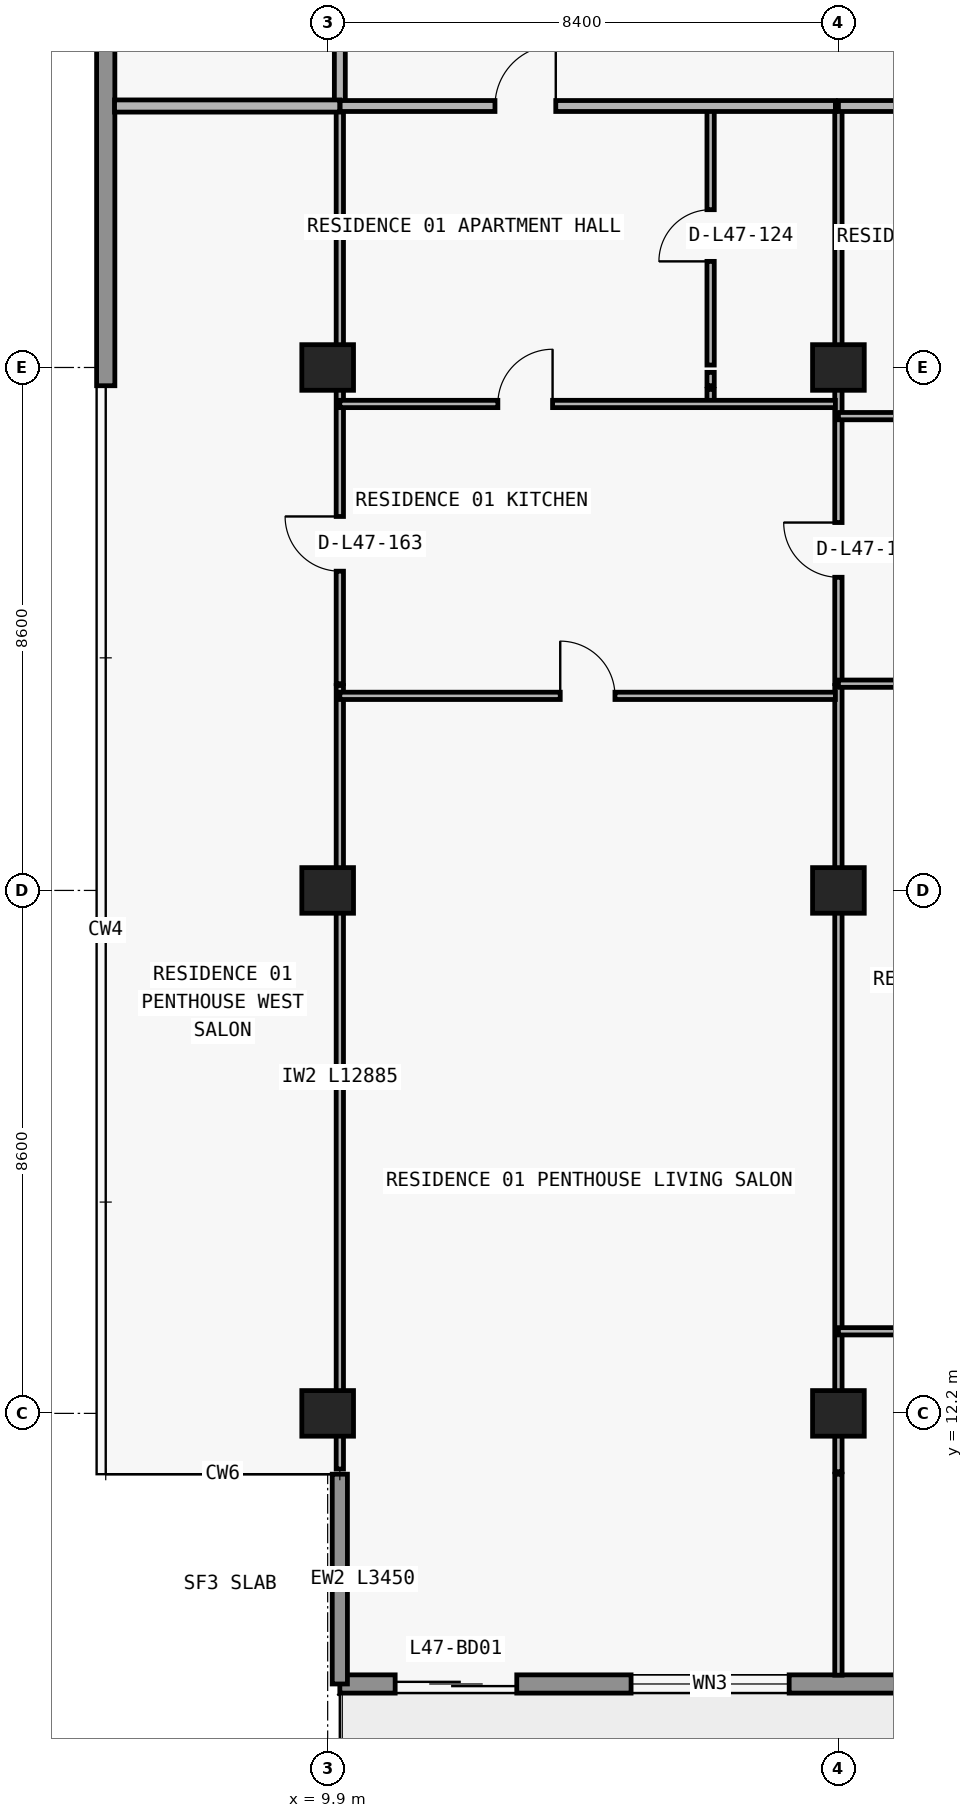
"""IFC4 building model, lengths in metres.
Left out: names, types, materials, properties, quantities, classifications, styles, units other than length and angle.
Written with IfcOpenShell. Run it as: python <this file> out.ifc"""

import sys

from ifc_helpers import new_model, si_unit, direction, frame, frame_2d, origin, origin_2d, place, context, subcontext, project, spatial, rectangle, extrude, element, fill, save


model = new_model("IFC4")
c1 = context("Model", 3, precision=1e-05, world=origin(), true_north=direction((0.0, 1.0)))
c2 = subcontext(c1, "Body", "Model", "MODEL_VIEW")
j1 = project(units=[si_unit("LENGTHUNIT", "METRE"), si_unit("PLANEANGLEUNIT", "RADIAN")], contexts=[c1])
p1 = place(None, origin())
s1 = spatial("IfcSite", under=j1, at=p1, CompositionType="ELEMENT")
p2 = place(p1, origin())
s2 = spatial("IfcBuilding", under=s1, at=p2, CompositionType="ELEMENT")
p3 = place(p2, frame((0.0, 0.0, 170.4)))
s3 = spatial("IfcBuildingStorey", under=s2, at=p3, CompositionType="ELEMENT", Elevation=170.4)
for number, where, z_axis, x_axis in (
    (1, (9.9, 12.2, 0.0), (0.0, 0.0, 1.0), (1.0, 0.0, 0.0)),
    (2, (18.3, 12.2, 0.0), (0.0, 0.0, 1.0), (1.0, 0.0, 0.0)),
    (3, (9.9, 20.8, 0.0), (0.0, 0.0, 1.0), (1.0, 0.0, 0.0)),
    (4, (18.3, 20.8, 0.0), (0.0, 0.0, 1.0), (1.0, 0.0, 0.0)),
    (5, (9.9, 29.4, 0.0), (0.0, 0.0, 1.0), (1.0, 0.0, 0.0)),
    (6, (18.3, 29.4, 0.0), (0.0, 0.0, 1.0), (1.0, 0.0, 0.0)),
):
    element("IfcColumn", number, at=place(p3, frame(where, z_axis=z_axis, x_axis=x_axis)), inside=s3, PredefinedType="COLUMN", context=c2, shape_type="SweptSolid", body=[
        extrude(rectangle(XDim=0.85, YDim=0.75, at=origin_2d()), origin(), (0.0, 0.0, 1.0), 3.05),
    ])
p4 = place(p3, frame((67.7, 7.75, 0.0), z_axis=(0.0, 0.0, 1.0), x_axis=(-1.0, 0.0, 0.0)))
e7 = element("IfcWall", 7, at=p4, inside=s3, PredefinedType="STANDARD", context=c2, shape_type="SweptSolid", body=[
    extrude(rectangle(XDim=57.6, YDim=0.3, at=frame_2d((28.8, 0.0))), origin(), (0.0, 0.0, 1.0), 3.05),
])
p5 = place(p4, frame((54.69, 0.0, 0.0)))
e8 = element("IfcOpeningElement", 8, at=p5, cuts=e7, PredefinedType="OPENING", context=c2, shape_type="SweptSolid", body=[
    extrude(rectangle(XDim=2.0, YDim=2.3, at=frame_2d((1.0, 1.15))), frame((0.0, 0.16, 0.0), z_axis=(0.0, -1.0, 0.0), x_axis=(1.0, 0.0, 0.0)), (0.0, 0.0, 1.0), 0.32),
])
p6 = place(p4, frame((50.21, 0.0, 0.65)))
e9 = element("IfcOpeningElement", 9, at=p6, cuts=e7, PredefinedType="OPENING", context=c2, shape_type="SweptSolid", body=[
    extrude(rectangle(XDim=2.6, YDim=1.85, at=frame_2d((1.3, 0.925))), frame((0.0, 0.16, 0.0), z_axis=(0.0, -1.0, 0.0), x_axis=(1.0, 0.0, 0.0)), (0.0, 0.0, 1.0), 0.32),
])
p7 = place(p4, frame((44.1, 0.0, 0.85)))
e10 = element("IfcOpeningElement", 10, at=p7, cuts=e7, PredefinedType="OPENING", context=c2, shape_type="SweptSolid", body=[
    extrude(rectangle(XDim=2.2, YDim=1.55, at=frame_2d((1.1, 0.775))), frame((0.0, 0.16, 0.0), z_axis=(0.0, -1.0, 0.0), x_axis=(1.0, 0.0, 0.0)), (0.0, 0.0, 1.0), 0.32),
])
p8 = place(p4, frame((37.69, 0.0, 0.0)))
e11 = element("IfcOpeningElement", 11, at=p8, cuts=e7, PredefinedType="OPENING", context=c2, shape_type="SweptSolid", body=[
    extrude(rectangle(XDim=2.0, YDim=2.3, at=frame_2d((1.0, 1.15))), frame((0.0, 0.16, 0.0), z_axis=(0.0, -1.0, 0.0), x_axis=(1.0, 0.0, 0.0)), (0.0, 0.0, 1.0), 0.32),
])
p9 = place(p4, frame((33.59, 0.0, 0.85)))
e12 = element("IfcOpeningElement", 12, at=p9, cuts=e7, PredefinedType="OPENING", context=c2, shape_type="SweptSolid", body=[
    extrude(rectangle(XDim=1.8, YDim=1.55, at=frame_2d((0.9, 0.775))), frame((0.0, 0.16, 0.0), z_axis=(0.0, -1.0, 0.0), x_axis=(1.0, 0.0, 0.0)), (0.0, 0.0, 1.0), 0.32),
])
p10 = place(p4, frame((25.914, 0.0, 0.85)))
e13 = element("IfcOpeningElement", 13, at=p10, cuts=e7, PredefinedType="OPENING", context=c2, shape_type="SweptSolid", body=[
    extrude(rectangle(XDim=2.2, YDim=1.55, at=frame_2d((1.1, 0.775))), frame((0.0, 0.16, 0.0), z_axis=(0.0, -1.0, 0.0), x_axis=(1.0, 0.0, 0.0)), (0.0, 0.0, 1.0), 0.32),
])
p11 = place(p4, frame((21.69, 0.0, 0.0)))
e14 = element("IfcOpeningElement", 14, at=p11, cuts=e7, PredefinedType="OPENING", context=c2, shape_type="SweptSolid", body=[
    extrude(rectangle(XDim=2.0, YDim=2.3, at=frame_2d((1.0, 1.15))), frame((0.0, 0.16, 0.0), z_axis=(0.0, -1.0, 0.0), x_axis=(1.0, 0.0, 0.0)), (0.0, 0.0, 1.0), 0.32),
])
p12 = place(p4, frame((17.59, 0.0, 0.85)))
e15 = element("IfcOpeningElement", 15, at=p12, cuts=e7, PredefinedType="OPENING", context=c2, shape_type="SweptSolid", body=[
    extrude(rectangle(XDim=1.8, YDim=1.55, at=frame_2d((0.9, 0.775))), frame((0.0, 0.16, 0.0), z_axis=(0.0, -1.0, 0.0), x_axis=(1.0, 0.0, 0.0)), (0.0, 0.0, 1.0), 0.32),
])
p13 = place(p4, frame((13.69, 0.0, 0.0)))
e16 = element("IfcOpeningElement", 16, at=p13, cuts=e7, PredefinedType="OPENING", context=c2, shape_type="SweptSolid", body=[
    extrude(rectangle(XDim=2.0, YDim=2.3, at=frame_2d((1.0, 1.15))), frame((0.0, 0.16, 0.0), z_axis=(0.0, -1.0, 0.0), x_axis=(1.0, 0.0, 0.0)), (0.0, 0.0, 1.0), 0.32),
])
p14 = place(p4, frame((9.01, 0.0, 0.65)))
e17 = element("IfcOpeningElement", 17, at=p14, cuts=e7, PredefinedType="OPENING", context=c2, shape_type="SweptSolid", body=[
    extrude(rectangle(XDim=2.6, YDim=1.85, at=frame_2d((1.3, 0.925))), frame((0.0, 0.16, 0.0), z_axis=(0.0, -1.0, 0.0), x_axis=(1.0, 0.0, 0.0)), (0.0, 0.0, 1.0), 0.32),
])
p15 = place(p4, frame((3.0, 0.0, 0.85)))
e18 = element("IfcOpeningElement", 18, at=p15, cuts=e7, PredefinedType="OPENING", context=c2, shape_type="SweptSolid", body=[
    extrude(rectangle(XDim=2.2, YDim=1.55, at=frame_2d((1.1, 0.775))), frame((0.0, 0.16, 0.0), z_axis=(0.0, -1.0, 0.0), x_axis=(1.0, 0.0, 0.0)), (0.0, 0.0, 1.0), 0.32),
])
p16 = place(p3, frame((10.1, 11.2, 0.0), z_axis=(0.0, 0.0, 1.0), x_axis=(0.0, -1.0, 0.0)))
e19 = element("IfcWall", 19, at=p16, inside=s3, PredefinedType="ELEMENTEDWALL", context=c2, shape_type="SweptSolid", body=[
    extrude(rectangle(XDim=3.45, YDim=0.25, at=frame_2d((1.725, 0.0))), origin(), (0.0, 0.0, 1.0), 3.05),
])
p17 = place(p3, frame((6.25, 29.1, 0.0), z_axis=(0.0, 0.0, 1.0), x_axis=(0.0, 1.0, 0.0)))
e20 = element("IfcWall", 20, at=p17, inside=s3, PredefinedType="STANDARD", context=c2, shape_type="SweptSolid", body=[
    extrude(rectangle(XDim=17.9, YDim=0.3, at=frame_2d((8.95, 0.0))), origin(), (0.0, 0.0, 1.0), 3.05),
])
p18 = place(p3, frame((10.1, 11.285, 0.0), z_axis=(0.0, 0.0, 1.0), x_axis=(0.0, 1.0, 0.0)))
e21 = element("IfcWall", 21, at=p18, inside=s3, PredefinedType="PARTITIONING", context=c2, shape_type="SweptSolid", body=[
    extrude(rectangle(XDim=12.885, YDim=0.12, at=frame_2d((6.442, 0.0))), origin(), (0.0, 0.0, 1.0), 2.263),
])
p19 = place(p3, frame((10.1, 24.2, 0.0), z_axis=(0.0, 0.0, 1.0), x_axis=(0.0, 1.0, 0.0)))
e22 = element("IfcWall", 22, at=p19, inside=s3, PredefinedType="PARTITIONING", context=c2, shape_type="SweptSolid", body=[
    extrude(rectangle(XDim=4.84, YDim=0.12, at=frame_2d((2.42, 0.0))), origin(), (0.0, 0.0, 1.0), 2.263),
])
p20 = place(p19, frame((1.85, 0.0, 0.0)))
e23 = element("IfcOpeningElement", 23, at=p20, cuts=e22, PredefinedType="OPENING", context=c2, shape_type="SweptSolid", body=[
    extrude(rectangle(XDim=0.9, YDim=2.15, at=frame_2d((0.45, 1.075))), frame((0.0, 0.07, 0.0), z_axis=(0.0, -1.0, 0.0), x_axis=(1.0, 0.0, 0.0)), (0.0, 0.0, 1.0), 0.14),
])
p21 = place(p3, frame((10.1, 29.1, 0.0), z_axis=(0.0, 0.0, 1.0), x_axis=(0.0, 1.0, 0.0)))
e24 = element("IfcWall", 24, at=p21, inside=s3, PredefinedType="PARTITIONING", context=c2, shape_type="SweptSolid", body=[
    extrude(rectangle(XDim=0.22, YDim=0.12, at=frame_2d((0.11, 0.0))), origin(), (0.0, 0.0, 1.0), 3.05),
])
p22 = place(p3, frame((10.1, 29.44, 0.0), z_axis=(0.0, 0.0, 1.0), x_axis=(0.0, 1.0, 0.0)))
e25 = element("IfcWall", 25, at=p22, inside=s3, PredefinedType="PARTITIONING", context=c2, shape_type="SweptSolid", body=[
    extrude(rectangle(XDim=4.26, YDim=0.12, at=frame_2d((2.13, 0.0))), origin(), (0.0, 0.0, 1.0), 2.263),
])
p23 = place(p3, frame((10.1, 33.705, 0.0), z_axis=(0.0, 0.0, 1.0), x_axis=(0.0, 1.0, 0.0)))
e26 = element("IfcWall", 26, at=p23, inside=s3, PredefinedType="PARTITIONING", context=c2, shape_type="SweptSolid", body=[
    extrude(rectangle(XDim=3.245, YDim=0.18, at=frame_2d((1.623, 0.0))), origin(), (0.0, 0.0, 1.0), 2.263),
])
p24 = place(p3, frame((16.198, 28.8, 0.0), z_axis=(0.0, 0.0, 1.0), x_axis=(0.0, 1.0, 0.0)))
e27 = element("IfcWall", 27, at=p24, inside=s3, PredefinedType="PARTITIONING", context=c2, shape_type="SweptSolid", body=[
    extrude(rectangle(XDim=0.24, YDim=0.12, at=frame_2d((0.12, 0.0))), origin(), (0.0, 0.0, 1.0), 3.05),
])
p25 = place(p3, frame((16.198, 29.1, 0.0), z_axis=(0.0, 0.0, 1.0), x_axis=(0.0, 1.0, 0.0)))
e28 = element("IfcWall", 28, at=p25, inside=s3, PredefinedType="PARTITIONING", context=c2, shape_type="SweptSolid", body=[
    extrude(rectangle(XDim=0.22, YDim=0.12, at=frame_2d((0.11, 0.0))), origin(), (0.0, 0.0, 1.0), 3.05),
])
p26 = place(p3, frame((16.198, 29.44, 0.0), z_axis=(0.0, 0.0, 1.0), x_axis=(0.0, 1.0, 0.0)))
e29 = element("IfcWall", 29, at=p26, inside=s3, PredefinedType="PARTITIONING", context=c2, shape_type="SweptSolid", body=[
    extrude(rectangle(XDim=4.26, YDim=0.12, at=frame_2d((2.13, 0.0))), origin(), (0.0, 0.0, 1.0), 3.05),
])
p27 = place(p26, frame((1.705, 0.0, 0.0)))
e30 = element("IfcOpeningElement", 30, at=p27, cuts=e29, PredefinedType="OPENING", context=c2, shape_type="SweptSolid", body=[
    extrude(rectangle(XDim=0.85, YDim=2.1, at=frame_2d((0.425, 1.05))), frame((0.0, 0.07, 0.0), z_axis=(0.0, -1.0, 0.0), x_axis=(1.0, 0.0, 0.0)), (0.0, 0.0, 1.0), 0.14),
])
p28 = place(p3, frame((18.3, 7.895, 0.0), z_axis=(0.0, 0.0, 1.0), x_axis=(0.0, 1.0, 0.0)))
e31 = element("IfcWall", 31, at=p28, inside=s3, PredefinedType="PARTITIONING", context=c2, shape_type="SweptSolid", body=[
    extrude(rectangle(XDim=3.305, YDim=0.12, at=frame_2d((1.652, 0.0))), origin(), (0.0, 0.0, 1.0), 3.05),
])
p29 = place(p3, frame((18.3, 11.24, 0.0), z_axis=(0.0, 0.0, 1.0), x_axis=(0.0, 1.0, 0.0)))
e32 = element("IfcWall", 32, at=p29, inside=s3, PredefinedType="PARTITIONING", context=c2, shape_type="SweptSolid", body=[
    extrude(rectangle(XDim=12.93, YDim=0.12, at=frame_2d((6.465, 0.0))), origin(), (0.0, 0.0, 1.0), 2.263),
])
p30 = place(p3, frame((18.3, 24.2, 0.0), z_axis=(0.0, 0.0, 1.0), x_axis=(0.0, 1.0, 0.0)))
e33 = element("IfcWall", 33, at=p30, inside=s3, PredefinedType="PARTITIONING", context=c2, shape_type="SweptSolid", body=[
    extrude(rectangle(XDim=4.84, YDim=0.12, at=frame_2d((2.42, 0.0))), origin(), (0.0, 0.0, 1.0), 2.263),
])
p31 = place(p30, frame((1.75, 0.0, 0.0)))
e34 = element("IfcOpeningElement", 34, at=p31, cuts=e33, PredefinedType="OPENING", context=c2, shape_type="SweptSolid", body=[
    extrude(rectangle(XDim=0.9, YDim=2.15, at=frame_2d((0.45, 1.075))), frame((0.0, 0.07, 0.0), z_axis=(0.0, -1.0, 0.0), x_axis=(1.0, 0.0, 0.0)), (0.0, 0.0, 1.0), 0.14),
])
p32 = place(p3, frame((18.3, 29.1, 0.0), z_axis=(0.0, 0.0, 1.0), x_axis=(0.0, 1.0, 0.0)))
e35 = element("IfcWall", 35, at=p32, inside=s3, PredefinedType="PARTITIONING", context=c2, shape_type="SweptSolid", body=[
    extrude(rectangle(XDim=0.22, YDim=0.12, at=frame_2d((0.11, 0.0))), origin(), (0.0, 0.0, 1.0), 3.05),
])
p33 = place(p3, frame((18.3, 29.44, 0.0), z_axis=(0.0, 0.0, 1.0), x_axis=(0.0, 1.0, 0.0)))
e36 = element("IfcWall", 36, at=p33, inside=s3, PredefinedType="PARTITIONING", context=c2, shape_type="SweptSolid", body=[
    extrude(rectangle(XDim=4.26, YDim=0.12, at=frame_2d((2.13, 0.0))), origin(), (0.0, 0.0, 1.0), 2.263),
])
p34 = place(p3, frame((18.3, 13.55, 0.0), z_axis=(0.0, 0.0, 1.0), x_axis=(1.0, 0.0, 0.0)))
e37 = element("IfcWall", 37, at=p34, inside=s3, PredefinedType="PARTITIONING", context=c2, shape_type="SweptSolid", body=[
    extrude(rectangle(XDim=8.35, YDim=0.12, at=frame_2d((4.175, 0.0))), origin(), (0.0, 0.0, 1.0), 3.05),
])
p35 = place(p34, frame((3.725, 0.0, 0.0)))
e38 = element("IfcOpeningElement", 38, at=p35, cuts=e37, PredefinedType="OPENING", context=c2, shape_type="SweptSolid", body=[
    extrude(rectangle(XDim=0.9, YDim=2.15, at=frame_2d((0.45, 1.075))), frame((0.0, 0.07, 0.0), z_axis=(0.0, -1.0, 0.0), x_axis=(1.0, 0.0, 0.0)), (0.0, 0.0, 1.0), 0.14),
])
p36 = place(p3, frame((10.1, 24.0, 0.0), z_axis=(0.0, 0.0, 1.0), x_axis=(1.0, 0.0, 0.0)))
e39 = element("IfcWall", 39, at=p36, inside=s3, PredefinedType="PARTITIONING", context=c2, shape_type="SweptSolid", body=[
    extrude(rectangle(XDim=8.15, YDim=0.12, at=frame_2d((4.075, 0.0))), origin(), (0.0, 0.0, 1.0), 3.05),
])
p37 = place(p36, frame((3.625, 0.0, 0.0)))
e40 = element("IfcOpeningElement", 40, at=p37, cuts=e39, PredefinedType="OPENING", context=c2, shape_type="SweptSolid", body=[
    extrude(rectangle(XDim=0.9, YDim=2.15, at=frame_2d((0.45, 1.075))), frame((0.0, 0.07, 0.0), z_axis=(0.0, -1.0, 0.0), x_axis=(1.0, 0.0, 0.0)), (0.0, 0.0, 1.0), 0.14),
])
p38 = place(p3, frame((18.3, 24.2, 0.0), z_axis=(0.0, 0.0, 1.0), x_axis=(1.0, 0.0, 0.0)))
e41 = element("IfcWall", 41, at=p38, inside=s3, PredefinedType="PARTITIONING", context=c2, shape_type="SweptSolid", body=[
    extrude(rectangle(XDim=8.18, YDim=0.12, at=frame_2d((4.09, 0.0))), origin(), (0.0, 0.0, 1.0), 3.05),
])
p39 = place(p38, frame((3.64, 0.0, 0.0)))
e42 = element("IfcOpeningElement", 42, at=p39, cuts=e41, PredefinedType="OPENING", context=c2, shape_type="SweptSolid", body=[
    extrude(rectangle(XDim=0.9, YDim=2.15, at=frame_2d((0.45, 1.075))), frame((0.0, 0.07, 0.0), z_axis=(0.0, -1.0, 0.0), x_axis=(1.0, 0.0, 0.0)), (0.0, 0.0, 1.0), 0.14),
])
p40 = place(p3, frame((18.3, 28.6, 0.0), z_axis=(0.0, 0.0, 1.0), x_axis=(1.0, 0.0, 0.0)))
e43 = element("IfcWall", 43, at=p40, inside=s3, PredefinedType="PARTITIONING", context=c2, shape_type="SweptSolid", body=[
    extrude(rectangle(XDim=8.18, YDim=0.12, at=frame_2d((4.09, 0.0))), origin(), (0.0, 0.0, 1.0), 3.05),
])
p41 = place(p40, frame((2.809, 0.0, 0.0)))
e44 = element("IfcOpeningElement", 44, at=p41, cuts=e43, PredefinedType="OPENING", context=c2, shape_type="SweptSolid", body=[
    extrude(rectangle(XDim=0.9, YDim=2.15, at=frame_2d((0.45, 1.075))), frame((0.0, 0.07, 0.0), z_axis=(0.0, -1.0, 0.0), x_axis=(1.0, 0.0, 0.0)), (0.0, 0.0, 1.0), 0.14),
])
p42 = place(p3, frame((10.1, 28.8, 0.0), z_axis=(0.0, 0.0, 1.0), x_axis=(1.0, 0.0, 0.0)))
e45 = element("IfcWall", 45, at=p42, inside=s3, PredefinedType="PARTITIONING", context=c2, shape_type="SweptSolid", body=[
    extrude(rectangle(XDim=8.15, YDim=0.12, at=frame_2d((4.075, 0.0))), origin(), (0.0, 0.0, 1.0), 3.05),
])
p43 = place(p42, frame((2.599, 0.0, 0.0)))
e46 = element("IfcOpeningElement", 46, at=p43, cuts=e45, PredefinedType="OPENING", context=c2, shape_type="SweptSolid", body=[
    extrude(rectangle(XDim=0.9, YDim=2.15, at=frame_2d((0.45, 1.075))), frame((0.0, 0.07, 0.0), z_axis=(0.0, -1.0, 0.0), x_axis=(1.0, 0.0, 0.0)), (0.0, 0.0, 1.0), 0.14),
])
p44 = place(p3, frame((6.395, 33.7, 0.0), z_axis=(0.0, 0.0, 1.0), x_axis=(1.0, 0.0, 0.0)))
e47 = element("IfcWall", 47, at=p44, inside=s3, PredefinedType="PARTITIONING", context=c2, shape_type="SweptSolid", body=[
    extrude(rectangle(XDim=3.705, YDim=0.2, at=frame_2d((1.853, 0.0))), origin(), (0.0, 0.0, 1.0), 3.05),
])
p45 = place(p3, frame((10.105, 33.7, 0.0), z_axis=(0.0, 0.0, 1.0), x_axis=(1.0, 0.0, 0.0)))
e48 = element("IfcWall", 48, at=p45, inside=s3, PredefinedType="PARTITIONING", context=c2, shape_type="SweptSolid", body=[
    extrude(rectangle(XDim=8.145, YDim=0.18, at=frame_2d((4.073, 0.0))), origin(), (0.0, 0.0, 1.0), 3.05),
])
p46 = place(p45, frame((2.546, 0.0, 0.0)))
e49 = element("IfcOpeningElement", 49, at=p46, cuts=e48, PredefinedType="OPENING", context=c2, shape_type="SweptSolid", body=[
    extrude(rectangle(XDim=1.0, YDim=2.2, at=frame_2d((0.5, 1.1))), frame((0.0, 0.1, 0.0), z_axis=(0.0, -1.0, 0.0), x_axis=(1.0, 0.0, 0.0)), (0.0, 0.0, 1.0), 0.2),
])
p47 = place(p3, frame((18.3, 33.7, 0.0), z_axis=(0.0, 0.0, 1.0), x_axis=(1.0, 0.0, 0.0)))
e50 = element("IfcWall", 50, at=p47, inside=s3, PredefinedType="PARTITIONING", context=c2, shape_type="SweptSolid", body=[
    extrude(rectangle(XDim=8.35, YDim=0.18, at=frame_2d((4.175, 0.0))), origin(), (0.0, 0.0, 1.0), 3.05),
])
p48 = place(p5, origin())
e51 = element("IfcDoor", 51, at=p48, inside=s3, OperationType="DOUBLE_DOOR_SLIDING", PredefinedType="DOOR", context=c2, shape_type="SweptSolid", body=[
    extrude(rectangle(XDim=2.0, YDim=2.3, at=frame_2d((1.0, 1.15))), frame((0.0, 0.025, 0.0), z_axis=(0.0, -1.0, 0.0), x_axis=(1.0, 0.0, 0.0)), (0.0, 0.0, 1.0), 0.05),
])
fill(e8, e51)
p49 = place(p6, origin())
e52 = element("IfcWindow", 52, at=p49, inside=s3, PartitioningType="SINGLE_PANEL", PredefinedType="WINDOW", context=c2, shape_type="SweptSolid", body=[
    extrude(rectangle(XDim=2.6, YDim=1.85, at=frame_2d((1.3, 0.925))), frame((0.0, 0.03, 0.0), z_axis=(0.0, -1.0, 0.0), x_axis=(1.0, 0.0, 0.0)), (0.0, 0.0, 1.0), 0.06),
])
fill(e9, e52)
p50 = place(p46, origin())
e53 = element("IfcDoor", 53, at=p50, inside=s3, OperationType="SINGLE_SWING_RIGHT", PredefinedType="DOOR", context=c2, shape_type="SweptSolid", body=[
    extrude(rectangle(XDim=1.0, YDim=2.2, at=frame_2d((0.5, 1.1))), frame((0.0, 0.025, 0.0), z_axis=(0.0, -1.0, 0.0), x_axis=(1.0, 0.0, 0.0)), (0.0, 0.0, 1.0), 0.05),
])
fill(e49, e53)
p51 = place(p27, origin())
e54 = element("IfcDoor", 54, at=p51, inside=s3, OperationType="SINGLE_SWING_LEFT", PredefinedType="DOOR", context=c2, shape_type="SweptSolid", body=[
    extrude(rectangle(XDim=0.85, YDim=2.1, at=frame_2d((0.425, 1.05))), frame((0.0, 0.025, 0.0), z_axis=(0.0, -1.0, 0.0), x_axis=(1.0, 0.0, 0.0)), (0.0, 0.0, 1.0), 0.05),
])
fill(e30, e54)
p52 = place(p43, origin())
e55 = element("IfcDoor", 55, at=p52, inside=s3, OperationType="SINGLE_SWING_RIGHT", PredefinedType="DOOR", context=c2, shape_type="SweptSolid", body=[
    extrude(rectangle(XDim=0.9, YDim=2.15, at=frame_2d((0.45, 1.075))), frame((0.0, 0.025, 0.0), z_axis=(0.0, -1.0, 0.0), x_axis=(1.0, 0.0, 0.0)), (0.0, 0.0, 1.0), 0.05),
])
fill(e46, e55)
p53 = place(p37, origin())
e56 = element("IfcDoor", 56, at=p53, inside=s3, OperationType="SINGLE_SWING_LEFT", PredefinedType="DOOR", context=c2, shape_type="SweptSolid", body=[
    extrude(rectangle(XDim=0.9, YDim=2.15, at=frame_2d((0.45, 1.075))), frame((0.0, 0.025, 0.0), z_axis=(0.0, -1.0, 0.0), x_axis=(1.0, 0.0, 0.0)), (0.0, 0.0, 1.0), 0.05),
])
fill(e40, e56)
p54 = place(p31, origin())
e57 = element("IfcDoor", 57, at=p54, inside=s3, OperationType="SINGLE_SWING_RIGHT", PredefinedType="DOOR", context=c2, shape_type="SweptSolid", body=[
    extrude(rectangle(XDim=0.9, YDim=2.15, at=frame_2d((0.45, 1.075))), frame((0.0, 0.025, 0.0), z_axis=(0.0, -1.0, 0.0), x_axis=(1.0, 0.0, 0.0)), (0.0, 0.0, 1.0), 0.05),
])
fill(e34, e57)
p55 = place(p20, origin())
e58 = element("IfcDoor", 58, at=p55, inside=s3, OperationType="SINGLE_SWING_RIGHT", PredefinedType="DOOR", context=c2, shape_type="SweptSolid", body=[
    extrude(rectangle(XDim=0.9, YDim=2.15, at=frame_2d((0.45, 1.075))), frame((0.0, 0.025, 0.0), z_axis=(0.0, -1.0, 0.0), x_axis=(1.0, 0.0, 0.0)), (0.0, 0.0, 1.0), 0.05),
])
fill(e23, e58)
save(model, sys.argv[1])
